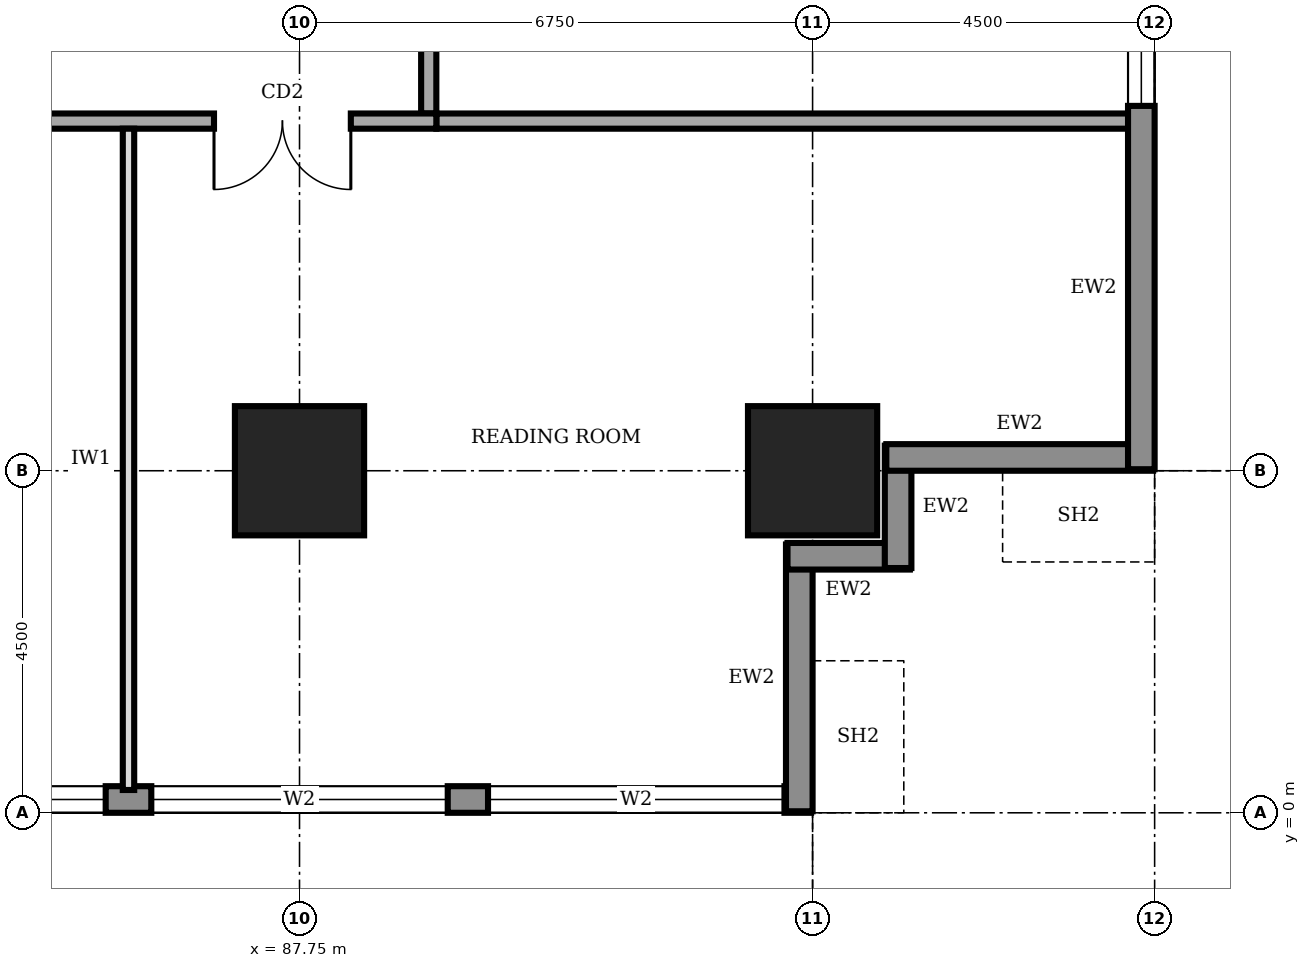
"""IFC4 building model, lengths in metres.
Left out: names, types, materials, properties, quantities, classifications, styles, units other than length and angle.
Written with IfcOpenShell. Run it as: python <this file> out.ifc"""

import sys

from ifc_helpers import new_model, si_unit, direction, frame, frame_2d, origin, origin_2d, place, context, subcontext, project, spatial, rectangle, extrude, element, fill, save


model = new_model("IFC4")
c1 = context("Model", 3, precision=1e-05, world=origin(), true_north=direction((0.0, 1.0)))
c2 = subcontext(c1, "Body", "Model", "MODEL_VIEW")
j1 = project(units=[si_unit("LENGTHUNIT", "METRE"), si_unit("PLANEANGLEUNIT", "RADIAN")], contexts=[c1])
p1 = place(None, origin())
s1 = spatial("IfcSite", under=j1, at=p1, CompositionType="ELEMENT")
p2 = place(p1, origin())
s2 = spatial("IfcBuilding", under=s1, at=p2, CompositionType="ELEMENT")
p3 = place(p2, frame((0.0, 0.0, 57.0)))
s3 = spatial("IfcBuildingStorey", under=s2, at=p3, CompositionType="ELEMENT", Elevation=57.0)
for number, where, z_axis, x_axis in (
    (1, (87.75, 4.5, 0.0), (0.0, 0.0, 1.0), (1.0, 0.0, 0.0)),
    (2, (94.5, 4.5, 0.0), (0.0, 0.0, 1.0), (1.0, 0.0, 0.0)),
):
    element("IfcColumn", number, at=place(p3, frame(where, z_axis=z_axis, x_axis=x_axis)), inside=s3, PredefinedType="COLUMN", context=c2, shape_type="SweptSolid", body=[
        extrude(rectangle(XDim=1.7, YDim=1.7, at=origin_2d()), origin(), (0.0, 0.0, 1.0), 4.0),
    ])
p4 = place(p3, frame((67.52, 0.175, 0.0), z_axis=(0.0, 0.0, 1.0), x_axis=(1.0, 0.0, 0.0)))
e3 = element("IfcWall", 3, at=p4, inside=s3, PredefinedType="STANDARD", context=c2, shape_type="SweptSolid", body=[
    extrude(rectangle(XDim=26.96, YDim=0.35, at=frame_2d((13.48, 0.0))), origin(), (0.0, 0.0, 1.0), 3.75),
])
p5 = place(p4, frame((4.78, 0.0, 0.6)))
e4 = element("IfcOpeningElement", 4, at=p5, cuts=e3, PredefinedType="OPENING", context=c2, shape_type="SweptSolid", body=[
    extrude(rectangle(XDim=3.9, YDim=2.6, at=frame_2d((1.95, 1.3))), frame((0.0, 0.185, 0.0), z_axis=(0.0, -1.0, 0.0), x_axis=(1.0, 0.0, 0.0)), (0.0, 0.0, 1.0), 0.37),
])
p6 = place(p4, frame((9.28, 0.0, 0.6)))
e5 = element("IfcOpeningElement", 5, at=p6, cuts=e3, PredefinedType="OPENING", context=c2, shape_type="SweptSolid", body=[
    extrude(rectangle(XDim=3.9, YDim=2.6, at=frame_2d((1.95, 1.3))), frame((0.0, 0.185, 0.0), z_axis=(0.0, -1.0, 0.0), x_axis=(1.0, 0.0, 0.0)), (0.0, 0.0, 1.0), 0.37),
])
p7 = place(p4, frame((13.78, 0.0, 0.6)))
e6 = element("IfcOpeningElement", 6, at=p7, cuts=e3, PredefinedType="OPENING", context=c2, shape_type="SweptSolid", body=[
    extrude(rectangle(XDim=3.9, YDim=2.6, at=frame_2d((1.95, 1.3))), frame((0.0, 0.185, 0.0), z_axis=(0.0, -1.0, 0.0), x_axis=(1.0, 0.0, 0.0)), (0.0, 0.0, 1.0), 0.37),
])
p8 = place(p4, frame((18.28, 0.0, 0.6)))
e7 = element("IfcOpeningElement", 7, at=p8, cuts=e3, PredefinedType="OPENING", context=c2, shape_type="SweptSolid", body=[
    extrude(rectangle(XDim=3.9, YDim=2.6, at=frame_2d((1.95, 1.3))), frame((0.0, 0.185, 0.0), z_axis=(0.0, -1.0, 0.0), x_axis=(1.0, 0.0, 0.0)), (0.0, 0.0, 1.0), 0.37),
])
p9 = place(p4, frame((22.71, 0.0, 0.6)))
e8 = element("IfcOpeningElement", 8, at=p9, cuts=e3, PredefinedType="OPENING", context=c2, shape_type="SweptSolid", body=[
    extrude(rectangle(XDim=3.9, YDim=2.6, at=frame_2d((1.95, 1.3))), frame((0.0, 0.185, 0.0), z_axis=(0.0, -1.0, 0.0), x_axis=(1.0, 0.0, 0.0)), (0.0, 0.0, 1.0), 0.37),
])
p10 = place(p3, frame((94.325, 0.02, 0.0), z_axis=(0.0, 0.0, 1.0), x_axis=(0.0, 1.0, 0.0)))
e9 = element("IfcWall", 9, at=p10, inside=s3, PredefinedType="STANDARD", context=c2, shape_type="SweptSolid", body=[
    extrude(rectangle(XDim=3.51, YDim=0.35, at=frame_2d((1.755, 0.0))), origin(), (0.0, 0.0, 1.0), 2.85),
])
for number, where, z_axis, x_axis in (
    (10, (94.17, 3.375, 0.0), (0.0, 0.0, 1.0), (1.0, 0.0, 0.0)),
    (11, (95.625, 3.22, 0.0), (0.0, 0.0, 1.0), (0.0, 1.0, 0.0)),
):
    element("IfcWall", number, at=place(p3, frame(where, z_axis=z_axis, x_axis=x_axis)), inside=s3, PredefinedType="STANDARD", context=c2, shape_type="SweptSolid", body=[
        extrude(rectangle(XDim=1.61, YDim=0.35, at=frame_2d((0.805, 0.0))), origin(), (0.0, 0.0, 1.0), 3.75),
    ])
p11 = place(p3, frame((95.47, 4.675, 0.0), z_axis=(0.0, 0.0, 1.0), x_axis=(1.0, 0.0, 0.0)))
e12 = element("IfcWall", 12, at=p11, inside=s3, PredefinedType="STANDARD", context=c2, shape_type="SweptSolid", body=[
    extrude(rectangle(XDim=3.51, YDim=0.35, at=frame_2d((1.755, 0.0))), origin(), (0.0, 0.0, 1.0), 2.85),
])
p12 = place(p3, frame((98.825, 4.52, 0.0), z_axis=(0.0, 0.0, 1.0), x_axis=(0.0, 1.0, 0.0)))
e13 = element("IfcWall", 13, at=p12, inside=s3, PredefinedType="STANDARD", context=c2, shape_type="SweptSolid", body=[
    extrude(rectangle(XDim=31.46, YDim=0.35, at=frame_2d((15.73, 0.0))), origin(), (0.0, 0.0, 1.0), 3.75),
])
p13 = place(p12, frame((4.78, 0.0, 0.6)))
e14 = element("IfcOpeningElement", 14, at=p13, cuts=e13, PredefinedType="OPENING", context=c2, shape_type="SweptSolid", body=[
    extrude(rectangle(XDim=3.9, YDim=2.6, at=frame_2d((1.95, 1.3))), frame((0.0, 0.185, 0.0), z_axis=(0.0, -1.0, 0.0), x_axis=(1.0, 0.0, 0.0)), (0.0, 0.0, 1.0), 0.37),
])
p14 = place(p12, frame((9.28, 0.0, 0.6)))
e15 = element("IfcOpeningElement", 15, at=p14, cuts=e13, PredefinedType="OPENING", context=c2, shape_type="SweptSolid", body=[
    extrude(rectangle(XDim=3.9, YDim=2.6, at=frame_2d((1.95, 1.3))), frame((0.0, 0.185, 0.0), z_axis=(0.0, -1.0, 0.0), x_axis=(1.0, 0.0, 0.0)), (0.0, 0.0, 1.0), 0.37),
])
p15 = place(p12, frame((13.78, 0.0, 0.6)))
e16 = element("IfcOpeningElement", 16, at=p15, cuts=e13, PredefinedType="OPENING", context=c2, shape_type="SweptSolid", body=[
    extrude(rectangle(XDim=3.9, YDim=2.6, at=frame_2d((1.95, 1.3))), frame((0.0, 0.185, 0.0), z_axis=(0.0, -1.0, 0.0), x_axis=(1.0, 0.0, 0.0)), (0.0, 0.0, 1.0), 0.37),
])
p16 = place(p12, frame((18.28, 0.0, 0.6)))
e17 = element("IfcOpeningElement", 17, at=p16, cuts=e13, PredefinedType="OPENING", context=c2, shape_type="SweptSolid", body=[
    extrude(rectangle(XDim=3.9, YDim=2.6, at=frame_2d((1.95, 1.3))), frame((0.0, 0.185, 0.0), z_axis=(0.0, -1.0, 0.0), x_axis=(1.0, 0.0, 0.0)), (0.0, 0.0, 1.0), 0.37),
])
p17 = place(p12, frame((22.78, 0.0, 0.6)))
e18 = element("IfcOpeningElement", 18, at=p17, cuts=e13, PredefinedType="OPENING", context=c2, shape_type="SweptSolid", body=[
    extrude(rectangle(XDim=3.9, YDim=2.6, at=frame_2d((1.95, 1.3))), frame((0.0, 0.185, 0.0), z_axis=(0.0, -1.0, 0.0), x_axis=(1.0, 0.0, 0.0)), (0.0, 0.0, 1.0), 0.37),
])
p18 = place(p12, frame((27.21, 0.0, 0.6)))
e19 = element("IfcOpeningElement", 19, at=p18, cuts=e13, PredefinedType="OPENING", context=c2, shape_type="SweptSolid", body=[
    extrude(rectangle(XDim=3.9, YDim=2.6, at=frame_2d((1.95, 1.3))), frame((0.0, 0.185, 0.0), z_axis=(0.0, -1.0, 0.0), x_axis=(1.0, 0.0, 0.0)), (0.0, 0.0, 1.0), 0.37),
])
p19 = place(p3, frame((71.9, 9.1, 0.0), z_axis=(0.0, 0.0, 1.0), x_axis=(1.0, 0.0, 0.0)))
e20 = element("IfcWall", 20, at=p19, inside=s3, PredefinedType="SOLIDWALL", context=c2, shape_type="SweptSolid", body=[
    extrude(rectangle(XDim=17.65, YDim=0.2, at=frame_2d((8.825, 0.0))), origin(), (0.0, 0.0, 1.0), 3.75),
])
p20 = place(p19, frame((5.8, 0.0, 0.0)))
e21 = element("IfcOpeningElement", 21, at=p20, cuts=e20, PredefinedType="OPENING", context=c2, shape_type="SweptSolid", body=[
    extrude(rectangle(XDim=1.8, YDim=2.1, at=frame_2d((0.9, 1.05))), frame((0.0, 0.11, 0.0), z_axis=(0.0, -1.0, 0.0), x_axis=(1.0, 0.0, 0.0)), (0.0, 0.0, 1.0), 0.22),
])
p21 = place(p19, frame((14.725, 0.0, 0.0)))
e22 = element("IfcOpeningElement", 22, at=p21, cuts=e20, PredefinedType="OPENING", context=c2, shape_type="SweptSolid", body=[
    extrude(rectangle(XDim=1.8, YDim=2.1, at=frame_2d((0.9, 1.05))), frame((0.0, 0.11, 0.0), z_axis=(0.0, -1.0, 0.0), x_axis=(1.0, 0.0, 0.0)), (0.0, 0.0, 1.0), 0.22),
])
p22 = place(p3, frame((89.45, 9.2, 0.0), z_axis=(0.0, 0.0, 1.0), x_axis=(0.0, 1.0, 0.0)))
e23 = element("IfcWall", 23, at=p22, inside=s3, PredefinedType="SOLIDWALL", context=c2, shape_type="SweptSolid", body=[
    extrude(rectangle(XDim=23.05, YDim=0.2, at=frame_2d((11.525, 0.0))), origin(), (0.0, 0.0, 1.0), 3.75),
])
p23 = place(p22, frame((1.55, 0.0, 0.0)))
e24 = element("IfcOpeningElement", 24, at=p23, cuts=e23, PredefinedType="OPENING", context=c2, shape_type="SweptSolid", body=[
    extrude(rectangle(XDim=1.0, YDim=2.1, at=frame_2d((0.5, 1.05))), frame((0.0, 0.11, 0.0), z_axis=(0.0, -1.0, 0.0), x_axis=(1.0, 0.0, 0.0)), (0.0, 0.0, 1.0), 0.22),
])
p24 = place(p22, frame((5.75, 0.0, 0.0)))
e25 = element("IfcOpeningElement", 25, at=p24, cuts=e23, PredefinedType="OPENING", context=c2, shape_type="SweptSolid", body=[
    extrude(rectangle(XDim=0.9, YDim=2.1, at=frame_2d((0.45, 1.05))), frame((0.0, 0.11, 0.0), z_axis=(0.0, -1.0, 0.0), x_axis=(1.0, 0.0, 0.0)), (0.0, 0.0, 1.0), 0.22),
])
p25 = place(p22, frame((8.75, 0.0, 0.0)))
e26 = element("IfcOpeningElement", 26, at=p25, cuts=e23, PredefinedType="OPENING", context=c2, shape_type="SweptSolid", body=[
    extrude(rectangle(XDim=0.9, YDim=2.1, at=frame_2d((0.45, 1.05))), frame((0.0, 0.11, 0.0), z_axis=(0.0, -1.0, 0.0), x_axis=(1.0, 0.0, 0.0)), (0.0, 0.0, 1.0), 0.22),
])
p26 = place(p22, frame((13.6, 0.0, 0.0)))
e27 = element("IfcOpeningElement", 27, at=p26, cuts=e23, PredefinedType="OPENING", context=c2, shape_type="SweptSolid", body=[
    extrude(rectangle(XDim=0.9, YDim=2.1, at=frame_2d((0.45, 1.05))), frame((0.0, 0.11, 0.0), z_axis=(0.0, -1.0, 0.0), x_axis=(1.0, 0.0, 0.0)), (0.0, 0.0, 1.0), 0.22),
])
p27 = place(p22, frame((16.3, 0.0, 0.0)))
e28 = element("IfcOpeningElement", 28, at=p27, cuts=e23, PredefinedType="OPENING", context=c2, shape_type="SweptSolid", body=[
    extrude(rectangle(XDim=1.0, YDim=2.1, at=frame_2d((0.5, 1.05))), frame((0.0, 0.11, 0.0), z_axis=(0.0, -1.0, 0.0), x_axis=(1.0, 0.0, 0.0)), (0.0, 0.0, 1.0), 0.22),
])
p28 = place(p22, frame((10.8, 0.0, 0.0)))
e29 = element("IfcOpeningElement", 29, at=p28, cuts=e23, PredefinedType="OPENING", context=c2, shape_type="SweptSolid", body=[
    extrude(rectangle(XDim=1.0, YDim=2.1, at=frame_2d((0.5, 1.05))), frame((0.0, 0.11, 0.0), z_axis=(0.0, -1.0, 0.0), x_axis=(1.0, 0.0, 0.0)), (0.0, 0.0, 1.0), 0.22),
])
p29 = place(p22, frame((19.925, 0.0, 0.0)))
e30 = element("IfcOpeningElement", 30, at=p29, cuts=e23, PredefinedType="OPENING", context=c2, shape_type="SweptSolid", body=[
    extrude(rectangle(XDim=1.0, YDim=2.1, at=frame_2d((0.5, 1.05))), frame((0.0, 0.11, 0.0), z_axis=(0.0, -1.0, 0.0), x_axis=(1.0, 0.0, 0.0)), (0.0, 0.0, 1.0), 0.22),
])
p30 = place(p3, frame((89.55, 9.1, 0.0), z_axis=(0.0, 0.0, 1.0), x_axis=(1.0, 0.0, 0.0)))
e31 = element("IfcWall", 31, at=p30, inside=s3, PredefinedType="SOLIDWALL", context=c2, shape_type="SweptSolid", body=[
    extrude(rectangle(XDim=9.15, YDim=0.2, at=frame_2d((4.575, 0.0))), origin(), (0.0, 0.0, 1.0), 3.75),
])
p31 = place(p3, frame((85.5, 0.3, 0.0), z_axis=(0.0, 0.0, 1.0), x_axis=(0.0, 1.0, 0.0)))
e32 = element("IfcWall", 32, at=p31, inside=s3, PredefinedType="PARTITIONING", context=c2, shape_type="SweptSolid", body=[
    extrude(rectangle(XDim=8.7, YDim=0.15, at=frame_2d((4.35, 0.0))), origin(), (0.0, 0.0, 1.0), 3.75),
])
p32 = place(p7, origin())
e33 = element("IfcWindow", 33, at=p32, inside=s3, PartitioningType="SINGLE_PANEL", PredefinedType="WINDOW", context=c2, shape_type="SweptSolid", body=[
    extrude(rectangle(XDim=3.9, YDim=2.6, at=frame_2d((1.95, 1.3))), frame((0.0, 0.03, 0.0), z_axis=(0.0, -1.0, 0.0), x_axis=(1.0, 0.0, 0.0)), (0.0, 0.0, 1.0), 0.06),
])
fill(e6, e33)
p33 = place(p8, origin())
e34 = element("IfcWindow", 34, at=p33, inside=s3, PartitioningType="SINGLE_PANEL", PredefinedType="WINDOW", context=c2, shape_type="SweptSolid", body=[
    extrude(rectangle(XDim=3.9, YDim=2.6, at=frame_2d((1.95, 1.3))), frame((0.0, 0.03, 0.0), z_axis=(0.0, -1.0, 0.0), x_axis=(1.0, 0.0, 0.0)), (0.0, 0.0, 1.0), 0.06),
])
fill(e7, e34)
p34 = place(p9, origin())
e35 = element("IfcWindow", 35, at=p34, inside=s3, PartitioningType="SINGLE_PANEL", PredefinedType="WINDOW", context=c2, shape_type="SweptSolid", body=[
    extrude(rectangle(XDim=3.9, YDim=2.6, at=frame_2d((1.95, 1.3))), frame((0.0, 0.03, 0.0), z_axis=(0.0, -1.0, 0.0), x_axis=(1.0, 0.0, 0.0)), (0.0, 0.0, 1.0), 0.06),
])
fill(e8, e35)
p35 = place(p13, origin())
e36 = element("IfcWindow", 36, at=p35, inside=s3, PartitioningType="SINGLE_PANEL", PredefinedType="WINDOW", context=c2, shape_type="SweptSolid", body=[
    extrude(rectangle(XDim=3.9, YDim=2.6, at=frame_2d((1.95, 1.3))), frame((0.0, 0.03, 0.0), z_axis=(0.0, -1.0, 0.0), x_axis=(1.0, 0.0, 0.0)), (0.0, 0.0, 1.0), 0.06),
])
fill(e14, e36)
p36 = place(p21, frame((1.8, 0.0, 0.0), z_axis=(0.0, 0.0, 1.0), x_axis=(-1.0, 0.0, 0.0)))
e37 = element("IfcDoor", 37, at=p36, inside=s3, OperationType="DOUBLE_DOOR_SINGLE_SWING", PredefinedType="DOOR", context=c2, shape_type="SweptSolid", body=[
    extrude(rectangle(XDim=1.8, YDim=2.1, at=frame_2d((0.9, 1.05))), frame((0.0, 0.025, 0.0), z_axis=(0.0, -1.0, 0.0), x_axis=(1.0, 0.0, 0.0)), (0.0, 0.0, 1.0), 0.05),
])
fill(e22, e37)
save(model, sys.argv[1])
